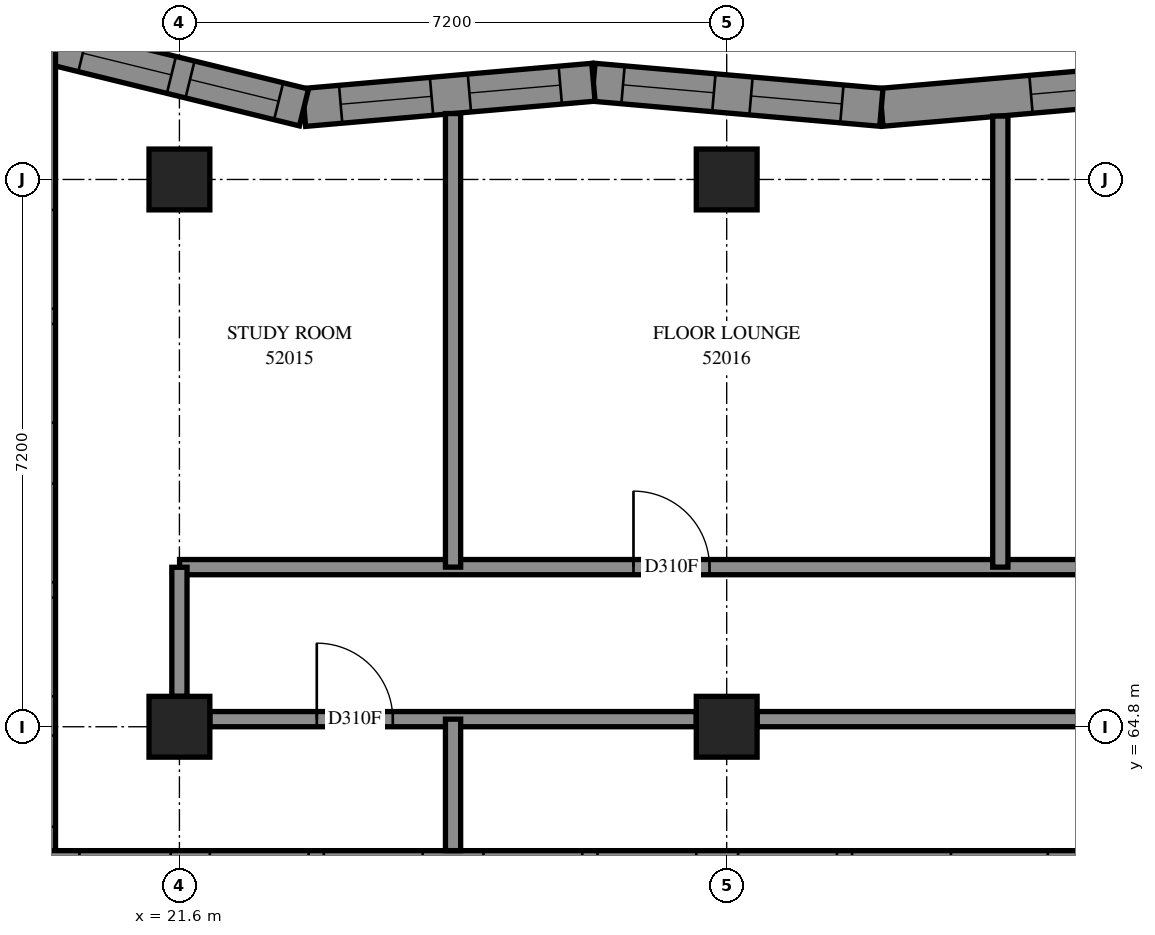
"""IFC4 building model, lengths in metres.
Left out: names, types, materials, properties, quantities, classifications, styles, units other than length and angle.
Written with IfcOpenShell. Run it as: python <this file> out.ifc"""

import sys

from ifc_helpers import new_model, si_unit, direction, frame, frame_2d, origin, origin_2d, place, context, subcontext, project, spatial, polyline, rectangle, outline, extrude, element, fill, save


model = new_model("IFC4")
c1 = context("Model", 3, precision=1e-05, world=origin(), true_north=direction((0.0, 1.0)))
c2 = subcontext(c1, "Body", "Model", "MODEL_VIEW")
j1 = project(units=[si_unit("LENGTHUNIT", "METRE"), si_unit("PLANEANGLEUNIT", "RADIAN")], contexts=[c1])
p1 = place(None, origin())
s1 = spatial("IfcSite", under=j1, at=p1, CompositionType="ELEMENT")
p2 = place(p1, origin())
s2 = spatial("IfcBuilding", under=s1, at=p2, CompositionType="ELEMENT")
p3 = place(p2, frame((0.0, 0.0, 193.0)))
s3 = spatial("IfcBuildingStorey", under=s2, at=p3, CompositionType="ELEMENT", Elevation=193.0)
for number, where, z_axis, x_axis in (
    (1, (21.6, 64.8, 0.0), (0.0, 0.0, 1.0), (1.0, 0.0, 0.0)),
    (2, (21.6, 72.0, 0.0), (0.0, 0.0, 1.0), (1.0, 0.0, 0.0)),
    (3, (28.8, 64.8, 0.0), (0.0, 0.0, 1.0), (1.0, 0.0, 0.0)),
    (4, (28.8, 72.0, 0.0), (0.0, 0.0, 1.0), (1.0, 0.0, 0.0)),
):
    element("IfcColumn", number, at=place(p3, frame(where, z_axis=z_axis, x_axis=x_axis)), inside=s3, PredefinedType="COLUMN", context=c2, shape_type="SweptSolid", body=[
        extrude(rectangle(XDim=0.8, YDim=0.8, at=origin_2d()), origin(), (0.0, 0.0, 1.0), 3.1),
    ])
p4 = place(p3, frame((34.623, 73.279, 0.0), z_axis=(0.0, 0.0, 1.0), x_axis=(-0.9962273538, -0.0867816769, 0.0)))
e5 = element("IfcWall", 5, at=p4, inside=s3, PredefinedType="SOLIDWALL", context=c2, shape_type="SweptSolid", body=[
    extrude(outline(polyline([(-0.022, -0.25), (3.781, -0.25), (3.824, 0.25), (0.022, 0.25), (-0.022, -0.25)])), origin(), (0.0, 0.0, 1.0), 3.1),
])
p5 = place(p4, frame((0.627, 0.0, 0.45)))
e6 = element("IfcOpeningElement", 6, at=p5, cuts=e5, PredefinedType="OPENING", context=c2, shape_type="SweptSolid", body=[
    extrude(rectangle(XDim=1.2, YDim=2.5, at=frame_2d((0.6, 1.25))), frame((0.0, 0.26, 0.0), z_axis=(0.0, -1.0, 0.0), x_axis=(1.0, 0.0, 0.0)), (0.0, 0.0, 1.0), 0.52),
])
p6 = place(p3, frame((30.835, 72.949, 0.0), z_axis=(0.0, 0.0, 1.0), x_axis=(-0.9962273538, 0.0867816769, 0.0)))
e7 = element("IfcWall", 7, at=p6, inside=s3, PredefinedType="SOLIDWALL", context=c2, shape_type="SweptSolid", body=[
    extrude(outline(polyline([(0.022, -0.25), (3.824, -0.25), (3.781, 0.25), (-0.022, 0.25), (0.022, -0.25)])), origin(), (0.0, 0.0, 1.0), 3.1),
])
p7 = place(p6, frame((0.521, 0.0, 0.45)))
e8 = element("IfcOpeningElement", 8, at=p7, cuts=e7, PredefinedType="OPENING", context=c2, shape_type="SweptSolid", body=[
    extrude(rectangle(XDim=1.2, YDim=2.5, at=frame_2d((0.6, 1.25))), frame((0.0, 0.26, 0.0), z_axis=(0.0, -1.0, 0.0), x_axis=(1.0, 0.0, 0.0)), (0.0, 0.0, 1.0), 0.52),
])
p8 = place(p6, frame((2.212, 0.0, 0.45)))
e9 = element("IfcOpeningElement", 9, at=p8, cuts=e7, PredefinedType="OPENING", context=c2, shape_type="SweptSolid", body=[
    extrude(rectangle(XDim=1.2, YDim=2.5, at=frame_2d((0.6, 1.25))), frame((0.0, 0.26, 0.0), z_axis=(0.0, -1.0, 0.0), x_axis=(1.0, 0.0, 0.0)), (0.0, 0.0, 1.0), 0.52),
])
p9 = place(p3, frame((27.047, 73.279, 0.0), z_axis=(0.0, 0.0, 1.0), x_axis=(-0.9962271263, -0.0867842891, 0.0)))
e10 = element("IfcWall", 10, at=p9, inside=s3, PredefinedType="SOLIDWALL", context=c2, shape_type="SweptSolid", body=[
    extrude(outline(polyline([(-0.022, -0.25), (3.781, -0.25), (3.864, 0.25), (0.022, 0.25), (-0.022, -0.25)])), origin(), (0.0, 0.0, 1.0), 3.1),
])
p10 = place(p9, frame((0.438, 0.0, 0.45)))
e11 = element("IfcOpeningElement", 11, at=p10, cuts=e10, PredefinedType="OPENING", context=c2, shape_type="SweptSolid", body=[
    extrude(rectangle(XDim=1.2, YDim=2.5, at=frame_2d((0.6, 1.25))), frame((0.0, 0.26, 0.0), z_axis=(0.0, -1.0, 0.0), x_axis=(1.0, 0.0, 0.0)), (0.0, 0.0, 1.0), 0.52),
])
p11 = place(p9, frame((2.138, 0.0, 0.45)))
e12 = element("IfcOpeningElement", 12, at=p11, cuts=e10, PredefinedType="OPENING", context=c2, shape_type="SweptSolid", body=[
    extrude(rectangle(XDim=1.2, YDim=2.5, at=frame_2d((0.6, 1.25))), frame((0.0, 0.26, 0.0), z_axis=(0.0, -1.0, 0.0), x_axis=(1.0, 0.0, 0.0)), (0.0, 0.0, 1.0), 0.52),
])
p12 = place(p3, frame((23.239, 72.947, 0.0), z_axis=(0.0, 0.0, 1.0), x_axis=(-0.9711662492, 0.2384032642, 0.0)))
e13 = element("IfcWall", 13, at=p12, inside=s3, PredefinedType="SOLIDWALL", context=c2, shape_type="SweptSolid", body=[
    extrude(outline(polyline([(0.041, -0.25), (3.942, -0.25), (3.304, 0.25), (-0.041, 0.25), (0.041, -0.25)])), origin(), (0.0, 0.0, 1.0), 3.1),
])
p13 = place(p12, frame((0.344, 0.0, 0.45)))
e14 = element("IfcOpeningElement", 14, at=p13, cuts=e13, PredefinedType="OPENING", context=c2, shape_type="SweptSolid", body=[
    extrude(rectangle(XDim=1.2, YDim=2.5, at=frame_2d((0.6, 1.25))), frame((0.0, 0.26, 0.0), z_axis=(0.0, -1.0, 0.0), x_axis=(1.0, 0.0, 0.0)), (0.0, 0.0, 1.0), 0.52),
])
p14 = place(p12, frame((1.796, 0.0, 0.45)))
e15 = element("IfcOpeningElement", 15, at=p14, cuts=e13, PredefinedType="OPENING", context=c2, shape_type="SweptSolid", body=[
    extrude(rectangle(XDim=1.2, YDim=2.5, at=frame_2d((0.6, 1.25))), frame((0.0, 0.26, 0.0), z_axis=(0.0, -1.0, 0.0), x_axis=(1.0, 0.0, 0.0)), (0.0, 0.0, 1.0), 0.52),
])
p15 = place(p3, frame((19.72, 73.811, 0.0), z_axis=(0.0, 0.0, 1.0), x_axis=(0.0, -1.0, 0.0)))
e16 = element("IfcWall", 16, at=p15, inside=s3, PredefinedType="SOLIDWALL", context=c2, shape_type="SweptSolid", body=[
    extrude(outline(polyline([(-0.319, -0.25), (11.141, -0.25), (10.641, 0.25), (0.319, 0.25), (-0.319, -0.25)])), origin(), (0.0, 0.0, 1.0), 3.1),
])
p16 = place(p15, frame((2.211, 0.0, 0.45)))
e17 = element("IfcOpeningElement", 17, at=p16, cuts=e16, PredefinedType="OPENING", context=c2, shape_type="SweptSolid", body=[
    extrude(rectangle(XDim=1.3, YDim=2.5, at=frame_2d((0.65, 1.25))), frame((0.0, 0.26, 0.0), z_axis=(0.0, -1.0, 0.0), x_axis=(1.0, 0.0, 0.0)), (0.0, 0.0, 1.0), 0.52),
])
p17 = place(p15, frame((3.711, 0.0, 0.45)))
e18 = element("IfcOpeningElement", 18, at=p17, cuts=e16, PredefinedType="OPENING", context=c2, shape_type="SweptSolid", body=[
    extrude(rectangle(XDim=1.3, YDim=2.5, at=frame_2d((0.65, 1.25))), frame((0.0, 0.26, 0.0), z_axis=(0.0, -1.0, 0.0), x_axis=(1.0, 0.0, 0.0)), (0.0, 0.0, 1.0), 0.52),
])
p18 = place(p15, frame((5.811, 0.0, 0.45)))
e19 = element("IfcOpeningElement", 19, at=p18, cuts=e16, PredefinedType="OPENING", context=c2, shape_type="SweptSolid", body=[
    extrude(rectangle(XDim=1.3, YDim=2.5, at=frame_2d((0.65, 1.25))), frame((0.0, 0.26, 0.0), z_axis=(0.0, -1.0, 0.0), x_axis=(1.0, 0.0, 0.0)), (0.0, 0.0, 1.0), 0.52),
])
p19 = place(p15, frame((7.311, 0.0, 0.45)))
e20 = element("IfcOpeningElement", 20, at=p19, cuts=e16, PredefinedType="OPENING", context=c2, shape_type="SweptSolid", body=[
    extrude(rectangle(XDim=1.3, YDim=2.5, at=frame_2d((0.65, 1.25))), frame((0.0, 0.26, 0.0), z_axis=(0.0, -1.0, 0.0), x_axis=(1.0, 0.0, 0.0)), (0.0, 0.0, 1.0), 0.52),
])
p20 = place(p15, frame((9.126, 0.0, 0.45)))
e21 = element("IfcOpeningElement", 21, at=p20, cuts=e16, PredefinedType="OPENING", context=c2, shape_type="SweptSolid", body=[
    extrude(rectangle(XDim=1.2, YDim=2.5, at=frame_2d((0.6, 1.25))), frame((0.0, 0.26, 0.0), z_axis=(0.0, -1.0, 0.0), x_axis=(1.0, 0.0, 0.0)), (0.0, 0.0, 1.0), 0.52),
])
p21 = place(p3, frame((19.72, 62.92, 0.0), z_axis=(0.0, 0.0, 1.0), x_axis=(1.0, 0.0, 0.0)))
e22 = element("IfcWall", 22, at=p21, inside=s3, PredefinedType="SOLIDWALL", context=c2, shape_type="SweptSolid", body=[
    extrude(outline(polyline([(-0.25, -0.25), (15.08, -0.25), (15.58, 0.25), (0.25, 0.25), (-0.25, -0.25)])), origin(), (0.0, 0.0, 1.0), 3.1),
])
p22 = place(p21, frame((2.28, 0.0, 0.45)))
e23 = element("IfcOpeningElement", 23, at=p22, cuts=e22, PredefinedType="OPENING", context=c2, shape_type="SweptSolid", body=[
    extrude(rectangle(XDim=1.3, YDim=2.5, at=frame_2d((0.65, 1.25))), frame((0.0, 0.26, 0.0), z_axis=(0.0, -1.0, 0.0), x_axis=(1.0, 0.0, 0.0)), (0.0, 0.0, 1.0), 0.52),
])
p23 = place(p21, frame((3.78, 0.0, 0.45)))
e24 = element("IfcOpeningElement", 24, at=p23, cuts=e22, PredefinedType="OPENING", context=c2, shape_type="SweptSolid", body=[
    extrude(rectangle(XDim=1.3, YDim=2.5, at=frame_2d((0.65, 1.25))), frame((0.0, 0.26, 0.0), z_axis=(0.0, -1.0, 0.0), x_axis=(1.0, 0.0, 0.0)), (0.0, 0.0, 1.0), 0.52),
])
p24 = place(p21, frame((5.88, 0.0, 0.45)))
e25 = element("IfcOpeningElement", 25, at=p24, cuts=e22, PredefinedType="OPENING", context=c2, shape_type="SweptSolid", body=[
    extrude(rectangle(XDim=1.3, YDim=2.5, at=frame_2d((0.65, 1.25))), frame((0.0, 0.26, 0.0), z_axis=(0.0, -1.0, 0.0), x_axis=(1.0, 0.0, 0.0)), (0.0, 0.0, 1.0), 0.52),
])
p25 = place(p21, frame((7.38, 0.0, 0.45)))
e26 = element("IfcOpeningElement", 26, at=p25, cuts=e22, PredefinedType="OPENING", context=c2, shape_type="SweptSolid", body=[
    extrude(rectangle(XDim=1.3, YDim=2.5, at=frame_2d((0.65, 1.25))), frame((0.0, 0.26, 0.0), z_axis=(0.0, -1.0, 0.0), x_axis=(1.0, 0.0, 0.0)), (0.0, 0.0, 1.0), 0.52),
])
p26 = place(p21, frame((9.23, 0.0, 0.45)))
e27 = element("IfcOpeningElement", 27, at=p26, cuts=e22, PredefinedType="OPENING", context=c2, shape_type="SweptSolid", body=[
    extrude(rectangle(XDim=1.3, YDim=2.5, at=frame_2d((0.65, 1.25))), frame((0.0, 0.26, 0.0), z_axis=(0.0, -1.0, 0.0), x_axis=(1.0, 0.0, 0.0)), (0.0, 0.0, 1.0), 0.52),
])
p27 = place(p21, frame((10.73, 0.0, 0.45)))
e28 = element("IfcOpeningElement", 28, at=p27, cuts=e22, PredefinedType="OPENING", context=c2, shape_type="SweptSolid", body=[
    extrude(rectangle(XDim=1.3, YDim=2.5, at=frame_2d((0.65, 1.25))), frame((0.0, 0.26, 0.0), z_axis=(0.0, -1.0, 0.0), x_axis=(1.0, 0.0, 0.0)), (0.0, 0.0, 1.0), 0.52),
])
p28 = place(p21, frame((0.565, 0.0, 0.45)))
e29 = element("IfcOpeningElement", 29, at=p28, cuts=e22, PredefinedType="OPENING", context=c2, shape_type="SweptSolid", body=[
    extrude(rectangle(XDim=1.2, YDim=2.5, at=frame_2d((0.6, 1.25))), frame((0.0, 0.26, 0.0), z_axis=(0.0, -1.0, 0.0), x_axis=(1.0, 0.0, 0.0)), (0.0, 0.0, 1.0), 0.52),
])
p29 = place(p21, frame((13.305, 0.0, 0.45)))
e30 = element("IfcOpeningElement", 30, at=p29, cuts=e22, PredefinedType="OPENING", context=c2, shape_type="SweptSolid", body=[
    extrude(rectangle(XDim=1.2, YDim=2.5, at=frame_2d((0.6, 1.25))), frame((0.0, 0.26, 0.0), z_axis=(0.0, -1.0, 0.0), x_axis=(1.0, 0.0, 0.0)), (0.0, 0.0, 1.0), 0.52),
])
p30 = place(p3, frame((21.602, 66.9, 0.0), z_axis=(0.0, 0.0, 1.0), x_axis=(1.0, 0.0, 0.0)))
e31 = element("IfcWall", 31, at=p30, inside=s3, PredefinedType="PARTITIONING", context=c2, shape_type="SweptSolid", body=[
    extrude(rectangle(XDim=18.998, YDim=0.2, at=frame_2d((9.499, 0.0))), origin(), (0.0, 0.0, 1.0), 3.1),
])
p31 = place(p30, frame((5.972, 0.0, 0.0)))
e32 = element("IfcOpeningElement", 32, at=p31, cuts=e31, PredefinedType="OPENING", context=c2, shape_type="SweptSolid", body=[
    extrude(rectangle(XDim=1.0, YDim=2.1, at=frame_2d((0.5, 1.05))), frame((0.0, 0.11, 0.0), z_axis=(0.0, -1.0, 0.0), x_axis=(1.0, 0.0, 0.0)), (0.0, 0.0, 1.0), 0.22),
])
p32 = place(p30, frame((13.172, 0.0, 0.0)))
e33 = element("IfcOpeningElement", 33, at=p32, cuts=e31, PredefinedType="OPENING", context=c2, shape_type="SweptSolid", body=[
    extrude(rectangle(XDim=1.0, YDim=2.1, at=frame_2d((0.5, 1.05))), frame((0.0, 0.11, 0.0), z_axis=(0.0, -1.0, 0.0), x_axis=(1.0, 0.0, 0.0)), (0.0, 0.0, 1.0), 0.22),
])
p33 = place(p3, frame((29.2, 64.9, 0.0), z_axis=(0.0, 0.0, 1.0), x_axis=(1.0, 0.0, 0.0)))
e34 = element("IfcWall", 34, at=p33, inside=s3, PredefinedType="PARTITIONING", context=c2, shape_type="SweptSolid", body=[
    extrude(rectangle(XDim=6.4, YDim=0.2, at=frame_2d((3.2, 0.0))), origin(), (0.0, 0.0, 1.0), 2.6),
])
p34 = place(p3, frame((22.0, 64.9, 0.0), z_axis=(0.0, 0.0, 1.0), x_axis=(1.0, 0.0, 0.0)))
e35 = element("IfcWall", 35, at=p34, inside=s3, PredefinedType="PARTITIONING", context=c2, shape_type="SweptSolid", body=[
    extrude(rectangle(XDim=6.4, YDim=0.2, at=frame_2d((3.2, 0.0))), origin(), (0.0, 0.0, 1.0), 2.6),
])
p35 = place(p34, frame((1.407, 0.0, 0.0)))
e36 = element("IfcOpeningElement", 36, at=p35, cuts=e35, PredefinedType="OPENING", context=c2, shape_type="SweptSolid", body=[
    extrude(rectangle(XDim=1.0, YDim=2.1, at=frame_2d((0.5, 1.05))), frame((0.0, 0.11, 0.0), z_axis=(0.0, -1.0, 0.0), x_axis=(1.0, 0.0, 0.0)), (0.0, 0.0, 1.0), 0.22),
])
p36 = place(p3, frame((25.2, 66.9, 0.0), z_axis=(0.0, 0.0, 1.0), x_axis=(0.0, 1.0, 0.0)))
e37 = element("IfcWall", 37, at=p36, inside=s3, PredefinedType="PARTITIONING", context=c2, shape_type="SweptSolid", body=[
    extrude(rectangle(XDim=5.967, YDim=0.2, at=frame_2d((2.984, 0.0))), origin(), (0.0, 0.0, 1.0), 3.1),
])
p37 = place(p3, frame((32.4, 66.9, 0.0), z_axis=(0.0, 0.0, 1.0), x_axis=(0.0, 1.0, 0.0)))
e38 = element("IfcWall", 38, at=p37, inside=s3, PredefinedType="PARTITIONING", context=c2, shape_type="SweptSolid", body=[
    extrude(rectangle(XDim=5.934, YDim=0.2, at=frame_2d((2.967, 0.0))), origin(), (0.0, 0.0, 1.0), 3.1),
])
p38 = place(p3, frame((21.6, 65.2, 0.0), z_axis=(0.0, 0.0, 1.0), x_axis=(0.0, 1.0, 0.0)))
e39 = element("IfcWall", 39, at=p38, inside=s3, PredefinedType="PARTITIONING", context=c2, shape_type="SweptSolid", body=[
    extrude(rectangle(XDim=1.698, YDim=0.2, at=frame_2d((0.849, 0.0))), origin(), (0.0, 0.0, 1.0), 2.6),
])
p39 = place(p3, frame((25.2, 63.17, 0.0), z_axis=(0.0, 0.0, 1.0), x_axis=(0.0, 1.0, 0.0)))
e40 = element("IfcWall", 40, at=p39, inside=s3, PredefinedType="PARTITIONING", context=c2, shape_type="SweptSolid", body=[
    extrude(rectangle(XDim=1.73, YDim=0.2, at=frame_2d((0.865, 0.0))), origin(), (0.0, 0.0, 1.0), 3.1),
])
p40 = place(p5, origin())
e41 = element("IfcWindow", 41, at=p40, inside=s3, PartitioningType="SINGLE_PANEL", PredefinedType="WINDOW", context=c2, shape_type="SweptSolid", body=[
    extrude(rectangle(XDim=1.2, YDim=2.5, at=frame_2d((0.6, 1.25))), frame((0.0, 0.18, 0.0), z_axis=(0.0, -1.0, 0.0), x_axis=(1.0, 0.0, 0.0)), (0.0, 0.0, 1.0), 0.06),
])
fill(e6, e41)
p41 = place(p7, origin())
e42 = element("IfcWindow", 42, at=p41, inside=s3, PartitioningType="SINGLE_PANEL", PredefinedType="WINDOW", context=c2, shape_type="SweptSolid", body=[
    extrude(rectangle(XDim=1.2, YDim=2.5, at=frame_2d((0.6, 1.25))), frame((0.0, 0.18, 0.0), z_axis=(0.0, -1.0, 0.0), x_axis=(1.0, 0.0, 0.0)), (0.0, 0.0, 1.0), 0.06),
])
fill(e8, e42)
p42 = place(p8, origin())
e43 = element("IfcWindow", 43, at=p42, inside=s3, PartitioningType="SINGLE_PANEL", PredefinedType="WINDOW", context=c2, shape_type="SweptSolid", body=[
    extrude(rectangle(XDim=1.2, YDim=2.5, at=frame_2d((0.6, 1.25))), frame((0.0, 0.18, 0.0), z_axis=(0.0, -1.0, 0.0), x_axis=(1.0, 0.0, 0.0)), (0.0, 0.0, 1.0), 0.06),
])
fill(e9, e43)
p43 = place(p10, origin())
e44 = element("IfcWindow", 44, at=p43, inside=s3, PartitioningType="SINGLE_PANEL", PredefinedType="WINDOW", context=c2, shape_type="SweptSolid", body=[
    extrude(rectangle(XDim=1.2, YDim=2.5, at=frame_2d((0.6, 1.25))), frame((0.0, 0.18, 0.0), z_axis=(0.0, -1.0, 0.0), x_axis=(1.0, 0.0, 0.0)), (0.0, 0.0, 1.0), 0.06),
])
fill(e11, e44)
p44 = place(p11, origin())
e45 = element("IfcWindow", 45, at=p44, inside=s3, PartitioningType="SINGLE_PANEL", PredefinedType="WINDOW", context=c2, shape_type="SweptSolid", body=[
    extrude(rectangle(XDim=1.2, YDim=2.5, at=frame_2d((0.6, 1.25))), frame((0.0, 0.18, 0.0), z_axis=(0.0, -1.0, 0.0), x_axis=(1.0, 0.0, 0.0)), (0.0, 0.0, 1.0), 0.06),
])
fill(e12, e45)
p45 = place(p13, origin())
e46 = element("IfcWindow", 46, at=p45, inside=s3, PartitioningType="SINGLE_PANEL", PredefinedType="WINDOW", context=c2, shape_type="SweptSolid", body=[
    extrude(rectangle(XDim=1.2, YDim=2.5, at=frame_2d((0.6, 1.25))), frame((0.0, 0.18, 0.0), z_axis=(0.0, -1.0, 0.0), x_axis=(1.0, 0.0, 0.0)), (0.0, 0.0, 1.0), 0.06),
])
fill(e14, e46)
p46 = place(p14, origin())
e47 = element("IfcWindow", 47, at=p46, inside=s3, PartitioningType="SINGLE_PANEL", PredefinedType="WINDOW", context=c2, shape_type="SweptSolid", body=[
    extrude(rectangle(XDim=1.2, YDim=2.5, at=frame_2d((0.6, 1.25))), frame((0.0, 0.18, 0.0), z_axis=(0.0, -1.0, 0.0), x_axis=(1.0, 0.0, 0.0)), (0.0, 0.0, 1.0), 0.06),
])
fill(e15, e47)
p47 = place(p35, origin())
e48 = element("IfcDoor", 48, at=p47, inside=s3, OperationType="SINGLE_SWING_RIGHT", PredefinedType="DOOR", context=c2, shape_type="SweptSolid", body=[
    extrude(rectangle(XDim=1.0, YDim=2.1, at=frame_2d((0.5, 1.05))), frame((0.0, 0.025, 0.0), z_axis=(0.0, -1.0, 0.0), x_axis=(1.0, 0.0, 0.0)), (0.0, 0.0, 1.0), 0.05),
])
fill(e36, e48)
p48 = place(p31, origin())
e49 = element("IfcDoor", 49, at=p48, inside=s3, OperationType="SINGLE_SWING_LEFT", PredefinedType="DOOR", context=c2, shape_type="SweptSolid", body=[
    extrude(rectangle(XDim=1.0, YDim=2.1, at=frame_2d((0.5, 1.05))), frame((0.0, 0.025, 0.0), z_axis=(0.0, -1.0, 0.0), x_axis=(1.0, 0.0, 0.0)), (0.0, 0.0, 1.0), 0.05),
])
fill(e32, e49)
save(model, sys.argv[1])
